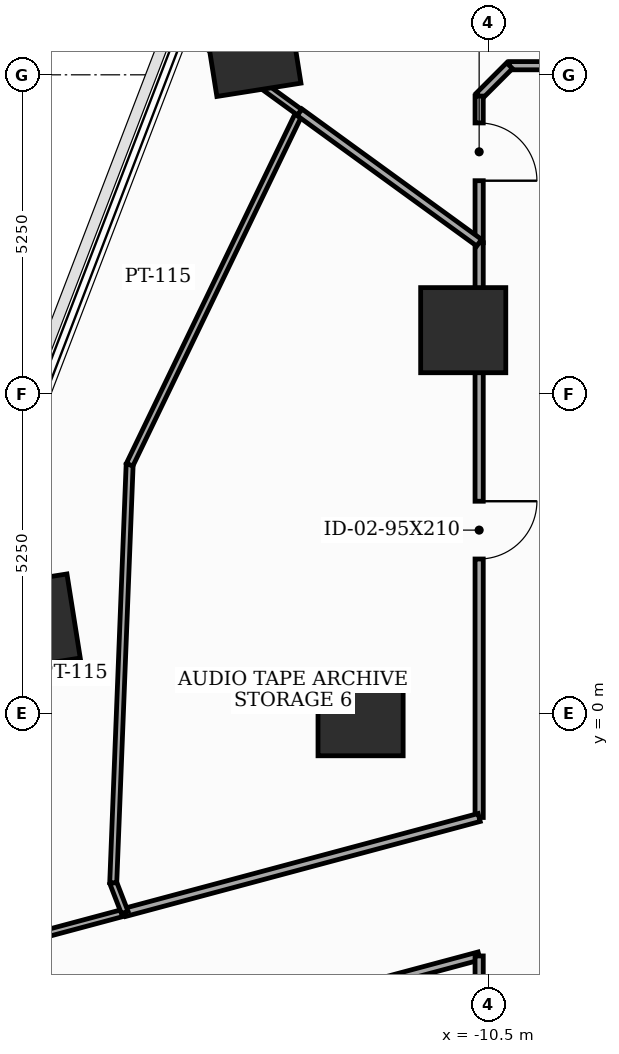
"""IFC4 building model, lengths in metres.
Left out: names, types, materials, properties, quantities, classifications, styles, units other than length and angle.
Written with IfcOpenShell. Run it as: python <this file> out.ifc"""

import sys

from ifc_helpers import new_model, si_unit, direction, frame, frame_2d, origin, origin_2d, place, context, subcontext, project, spatial, rectangle, extrude, element, fill, save


model = new_model("IFC4")
c1 = context("Model", 3, precision=1e-05, world=origin(), true_north=direction((0.0, 1.0)))
c2 = subcontext(c1, "Body", "Model", "MODEL_VIEW")
j1 = project(units=[si_unit("LENGTHUNIT", "METRE"), si_unit("PLANEANGLEUNIT", "RADIAN")], contexts=[c1])
p1 = place(None, origin())
s1 = spatial("IfcSite", under=j1, at=p1, CompositionType="ELEMENT")
p2 = place(p1, origin())
s2 = spatial("IfcBuilding", under=s1, at=p2, CompositionType="ELEMENT")
p3 = place(p2, frame((0.0, 0.0, 66.7)))
s3 = spatial("IfcBuildingStorey", under=s2, at=p3, CompositionType="ELEMENT", Elevation=66.7)
for number, where, z_axis, x_axis in (
    (1, (-10.912, 6.3, 0.0), (0.0, 0.0, 1.0), (1.0, 0.0, 0.0)),
    (2, (-12.6, 0.0, 0.0), (0.0, 0.0, 1.0), (1.0, 0.0, 0.0)),
    (3, (-14.381, 10.945, 0.0), (0.0, 0.0, 1.0), (0.988, 0.156, 0.0)),
    (4, (-18.011, 1.49, 0.0), (0.0, 0.0, 1.0), (0.988, 0.156, 0.0)),
):
    element("IfcColumn", number, at=place(p3, frame(where, z_axis=z_axis, x_axis=x_axis)), inside=s3, PredefinedType="COLUMN", context=c2, shape_type="SweptSolid", body=[
        extrude(rectangle(XDim=1.4, YDim=1.4, at=origin_2d()), origin(), (0.0, 0.0, 1.0), 3.7),
    ])
p4 = place(p3, frame((-15.677, -5.339, 0.0), z_axis=(0.0, 0.0, 1.0), x_axis=(0.965918107115, 0.258847851734, 0.0)))
e5 = element("IfcWall", 5, at=p4, inside=s3, PredefinedType="PARTITIONING", context=c2, shape_type="SweptSolid", body=[
    extrude(rectangle(XDim=5.205, YDim=0.135, at=frame_2d((2.602, 0.0))), origin(), (0.0, 0.0, 1.0), 2.785),
])
p5 = place(p3, frame((-10.65, -3.992, 0.0), z_axis=(0.0, 0.0, 1.0), x_axis=(0.0, -1.0, 0.0)))
e6 = element("IfcWall", 6, at=p5, inside=s3, PredefinedType="PARTITIONING", context=c2, shape_type="SweptSolid", body=[
    extrude(rectangle(XDim=6.158, YDim=0.135, at=frame_2d((3.079, 0.0))), origin(), (0.0, 0.0, 1.0), 2.785),
])
p6 = place(p5, frame((4.451, 0.0, 0.0)))
e7 = element("IfcOpeningElement", 7, at=p6, cuts=e6, PredefinedType="OPENING", context=c2, shape_type="SweptSolid", body=[
    extrude(rectangle(XDim=0.95, YDim=2.1, at=frame_2d((0.475, 1.05))), frame((0.0, 0.077, 0.0), z_axis=(0.0, -1.0, 0.0), x_axis=(1.0, 0.0, 0.0)), (0.0, 0.0, 1.0), 0.155),
])
p7 = place(p3, frame((-16.479, -3.277, 0.0), z_axis=(0.0, 0.0, 1.0), x_axis=(-0.965962825479, -0.258680922747, 0.0)))
e8 = element("IfcWall", 8, at=p7, inside=s3, PredefinedType="PARTITIONING", context=c2, shape_type="SweptSolid", body=[
    extrude(rectangle(XDim=3.835, YDim=0.115, at=frame_2d((1.917, 0.0))), origin(), (0.0, 0.0, 1.0), 2.935),
])
p8 = place(p3, frame((-10.65, 7.738, 0.0), z_axis=(0.0, 0.0, 1.0), x_axis=(0.0, -1.0, 0.0)))
e9 = element("IfcWall", 9, at=p8, inside=s3, PredefinedType="PARTITIONING", context=c2, shape_type="SweptSolid", body=[
    extrude(rectangle(XDim=9.453, YDim=0.135, at=frame_2d((4.727, 0.0))), origin(), (0.0, 0.0, 1.0), 2.785),
])
p9 = place(p8, frame((4.251, 0.0, 0.0)))
e10 = element("IfcOpeningElement", 10, at=p9, cuts=e9, PredefinedType="OPENING", context=c2, shape_type="SweptSolid", body=[
    extrude(rectangle(XDim=0.95, YDim=2.1, at=frame_2d((0.475, 1.05))), frame((0.0, 0.077, 0.0), z_axis=(0.0, -1.0, 0.0), x_axis=(1.0, 0.0, 0.0)), (0.0, 0.0, 1.0), 0.155),
])
p10 = place(p3, frame((-10.65, -1.715, 0.0), z_axis=(0.0, 0.0, 1.0), x_axis=(-0.965921324617, -0.258835844987, 0.0)))
e11 = element("IfcWall", 11, at=p10, inside=s3, PredefinedType="PARTITIONING", context=c2, shape_type="SweptSolid", body=[
    extrude(rectangle(XDim=6.035, YDim=0.135, at=frame_2d((3.017, 0.0))), origin(), (0.0, 0.0, 1.0), 2.785),
])
p11 = place(p3, frame((-2.655, 10.65, 0.0), z_axis=(0.0, 0.0, 1.0), x_axis=(-1.0, 0.0, 0.0)))
e12 = element("IfcWall", 12, at=p11, inside=s3, PredefinedType="PARTITIONING", context=c2, shape_type="SweptSolid", body=[
    extrude(rectangle(XDim=7.495, YDim=0.135, at=frame_2d((3.748, 0.0))), origin(), (0.0, 0.0, 1.0), 2.785),
])
p12 = place(p3, frame((-10.15, 10.65, 0.0), z_axis=(0.0, 0.0, 1.0), x_axis=(-0.707106781187, -0.707106781187, 0.0)))
e13 = element("IfcWall", 13, at=p12, inside=s3, PredefinedType="PARTITIONING", context=c2, shape_type="SweptSolid", body=[
    extrude(rectangle(XDim=0.707, YDim=0.135, at=frame_2d((0.354, 0.0))), origin(), (0.0, 0.0, 1.0), 3.5),
])
p13 = place(p3, frame((-10.65, 10.15, 0.0), z_axis=(0.0, 0.0, 1.0), x_axis=(0.0, -1.0, 0.0)))
e14 = element("IfcWall", 14, at=p13, inside=s3, PredefinedType="PARTITIONING", context=c2, shape_type="SweptSolid", body=[
    extrude(rectangle(XDim=2.412, YDim=0.135, at=frame_2d((1.206, 0.0))), origin(), (0.0, 0.0, 1.0), 3.5),
])
p14 = place(p13, frame((0.442, 0.0, 0.0)))
e15 = element("IfcOpeningElement", 15, at=p14, cuts=e14, PredefinedType="OPENING", context=c2, shape_type="SweptSolid", body=[
    extrude(rectangle(XDim=0.95, YDim=2.1, at=frame_2d((0.475, 1.05))), frame((0.0, 0.077, 0.0), z_axis=(0.0, -1.0, 0.0), x_axis=(1.0, 0.0, 0.0)), (0.0, 0.0, 1.0), 0.155),
])
p15 = place(p3, frame((-16.479, -3.277, 0.0), z_axis=(0.0, 0.0, 1.0), x_axis=(-0.361072625613, 0.932537698451, 0.0)))
e16 = element("IfcWall", 16, at=p15, inside=s3, PredefinedType="PARTITIONING", context=c2, shape_type="SweptSolid", body=[
    extrude(rectangle(XDim=0.523, YDim=0.115, at=frame_2d((0.262, 0.0))), origin(), (0.0, 0.0, 1.0), 3.5),
])
p16 = place(p3, frame((-16.668, -2.789, 0.0), z_axis=(0.0, 0.0, 1.0), x_axis=(0.039234181612, 0.99923004308, 0.0)))
e17 = element("IfcWall", 17, at=p16, inside=s3, PredefinedType="PARTITIONING", context=c2, shape_type="SweptSolid", body=[
    extrude(rectangle(XDim=6.882, YDim=0.115, at=frame_2d((3.441, 0.0))), origin(), (0.0, 0.0, 1.0), 2.785),
])
p17 = place(p3, frame((-16.398, 4.088, 0.0), z_axis=(0.0, 0.0, 1.0), x_axis=(0.434403094272, 0.900718575187, 0.0)))
e18 = element("IfcWall", 18, at=p17, inside=s3, PredefinedType="PARTITIONING", context=c2, shape_type="SweptSolid", body=[
    extrude(rectangle(XDim=6.434, YDim=0.115, at=frame_2d((3.217, 0.0))), origin(), (0.0, 0.0, 1.0), 2.785),
])
p18 = place(p3, frame((-13.603, 9.883, 0.0), z_axis=(0.0, 0.0, 1.0), x_axis=(-0.808955448279, 0.587869953901, 0.0)))
e19 = element("IfcWall", 19, at=p18, inside=s3, PredefinedType="PARTITIONING", context=c2, shape_type="SweptSolid", body=[
    extrude(rectangle(XDim=2.358, YDim=0.115, at=frame_2d((1.179, 0.0))), origin(), (0.0, 0.0, 1.0), 2.785),
])
p19 = place(p3, frame((-10.65, 7.738, 0.0), z_axis=(0.0, 0.0, 1.0), x_axis=(-0.809088823189, 0.587686375706, 0.0)))
e20 = element("IfcWall", 20, at=p19, inside=s3, PredefinedType="PARTITIONING", context=c2, shape_type="SweptSolid", body=[
    extrude(rectangle(XDim=3.65, YDim=0.135, at=frame_2d((1.825, 0.0))), origin(), (0.0, 0.0, 1.0), 2.785),
])
p20 = place(p9, origin())
e21 = element("IfcDoor", 21, at=p20, inside=s3, OperationType="SINGLE_SWING_LEFT", PredefinedType="DOOR", context=c2, shape_type="SweptSolid", body=[
    extrude(rectangle(XDim=0.95, YDim=2.1, at=frame_2d((0.475, 1.05))), frame((0.0, 0.025, 0.0), z_axis=(0.0, -1.0, 0.0), x_axis=(1.0, 0.0, 0.0)), (0.0, 0.0, 1.0), 0.05),
])
fill(e10, e21)
p21 = place(p14, origin())
e22 = element("IfcDoor", 22, at=p21, inside=s3, OperationType="SINGLE_SWING_RIGHT", PredefinedType="DOOR", context=c2, shape_type="SweptSolid", body=[
    extrude(rectangle(XDim=0.95, YDim=2.1, at=frame_2d((0.475, 1.05))), frame((0.0, 0.025, 0.0), z_axis=(0.0, -1.0, 0.0), x_axis=(1.0, 0.0, 0.0)), (0.0, 0.0, 1.0), 0.05),
])
fill(e15, e22)
save(model, sys.argv[1])
